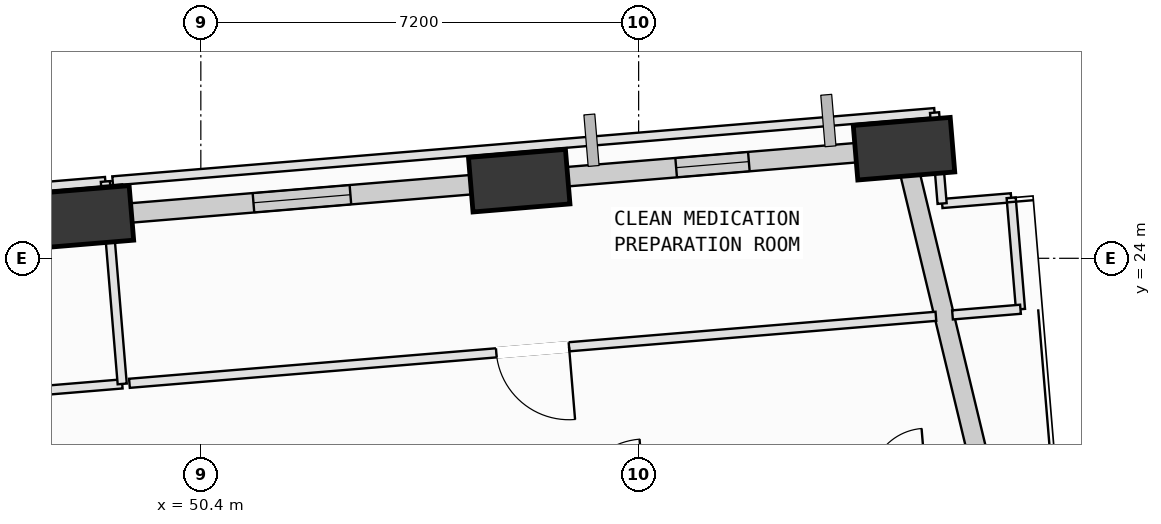
"""IFC4 building model, lengths in metres.
Left out: names, types, materials, properties, quantities, classifications, styles, units other than length and angle.
Written with IfcOpenShell. Run it as: python <this file> out.ifc"""

import sys

from ifc_helpers import new_model, si_unit, direction, frame, frame_2d, origin, origin_2d, place, context, subcontext, project, spatial, rectangle, extrude, element, fill, save


model = new_model("IFC4")
c1 = context("Model", 3, precision=1e-05, world=origin(), true_north=direction((0.0, 1.0)))
c2 = subcontext(c1, "Body", "Model", "MODEL_VIEW")
j1 = project(units=[si_unit("LENGTHUNIT", "METRE"), si_unit("PLANEANGLEUNIT", "RADIAN")], contexts=[c1])
p1 = place(None, origin())
s1 = spatial("IfcSite", under=j1, at=p1, CompositionType="ELEMENT")
p2 = place(p1, origin())
s2 = spatial("IfcBuilding", under=s1, at=p2, CompositionType="ELEMENT")
p3 = place(p2, frame((0.0, 0.0, 43.0)))
s3 = spatial("IfcBuildingStorey", under=s2, at=p3, CompositionType="ELEMENT", Elevation=43.0)
p4 = place(p3, frame((61.964, 25.802, 0.002), z_axis=(-0.00509619304, 0.116727088199, 0.993150953127), x_axis=(-0.992029926885, -0.125630471122, 0.009675168759)))
e1 = element("IfcColumn", 1, at=p4, inside=s3, PredefinedType="COLUMN", context=c2, shape_type="SweptSolid", body=[
    extrude(rectangle(XDim=1.6, YDim=0.9, at=origin_2d()), origin(), (0.0, 0.0, 1.0), 4.024),
])
p5 = place(p3, frame((55.636, 25.277, 0.002), z_axis=(-0.002737528383, 0.090946776294, 0.995851991925), x_axis=(-0.993633257969, -0.112410761084, 0.007534550471)))
e2 = element("IfcColumn", 2, at=p5, inside=s3, PredefinedType="COLUMN", context=c2, shape_type="SweptSolid", body=[
    extrude(rectangle(XDim=1.6, YDim=0.9, at=origin_2d()), origin(), (0.0, 0.0, 1.0), 4.013),
])
p6 = place(p3, frame((48.461, 24.68, 0.002), z_axis=(0.0, 0.061459648472, 0.99810956894), x_axis=(-0.996565502498, -0.082651664305, 0.005089363324)))
e3 = element("IfcColumn", 3, at=p6, inside=s3, PredefinedType="COLUMN", context=c2, shape_type="SweptSolid", body=[
    extrude(rectangle(XDim=1.6, YDim=0.9, at=origin_2d()), origin(), (0.0, 0.0, 1.0), 4.004),
])
p7 = place(p3, frame((62.052, 25.438, 0.0), z_axis=(0.0, 0.0, 1.0), x_axis=(0.234137183884, -0.972203568767, 0.0)))
e4 = element("IfcWall", 4, at=p7, inside=s3, PredefinedType="SOLIDWALL", context=c2, shape_type="SweptSolid", body=[
    extrude(rectangle(XDim=8.614, YDim=0.32, at=frame_2d((4.307, 0.0))), origin(), (0.0, 0.0, 1.0), 3.165),
])
p8 = place(p3, frame((56.224, 25.325, 0.0), z_axis=(0.0, 0.0, 1.0), x_axis=(0.996565124027, 0.08281276214, 0.0)))
e5 = element("IfcWall", 5, at=p8, inside=s3, PredefinedType="SOLIDWALL", context=c2, shape_type="SweptSolid", body=[
    extrude(rectangle(XDim=5.209, YDim=0.32, at=frame_2d((2.604, 0.0))), origin(), (0.0, 0.0, 1.0), 3.165),
])
p9 = place(p8, frame((2.0, 0.0, 0.75)))
e6 = element("IfcOpeningElement", 6, at=p9, cuts=e5, PredefinedType="OPENING", context=c2, shape_type="SweptSolid", body=[
    extrude(rectangle(XDim=1.2, YDim=1.75, at=frame_2d((0.6, 0.875))), frame((0.0, 0.17, 0.0), z_axis=(0.0, -1.0, 0.0), x_axis=(1.0, 0.0, 0.0)), (0.0, 0.0, 1.0), 0.34),
])
p10 = place(p3, frame((49.064, 24.73, 0.0), z_axis=(0.0, 0.0, 1.0), x_axis=(0.99656334349, 0.082834186251, 0.0)))
e7 = element("IfcWall", 7, at=p10, inside=s3, PredefinedType="SOLIDWALL", context=c2, shape_type="SweptSolid", body=[
    extrude(rectangle(XDim=6.024, YDim=0.32, at=frame_2d((3.012, 0.0))), origin(), (0.0, 0.0, 1.0), 3.165),
])
p11 = place(p10, frame((2.209, 0.0, 0.75)))
e8 = element("IfcOpeningElement", 8, at=p11, cuts=e7, PredefinedType="OPENING", context=c2, shape_type="SweptSolid", body=[
    extrude(rectangle(XDim=1.6, YDim=1.95, at=frame_2d((0.8, 0.975))), frame((0.0, 0.17, 0.0), z_axis=(0.0, -1.0, 0.0), x_axis=(1.0, 0.0, 0.0)), (0.0, 0.0, 1.0), 0.34),
])
p12 = place(p3, frame((49.107, 21.934, 0.0), z_axis=(0.0, 0.0, 1.0), x_axis=(-0.996568963574, -0.082766544215, 0.0)))
e9 = element("IfcWall", 9, at=p12, inside=s3, PredefinedType="PARTITIONING", context=c2, shape_type="SweptSolid", body=[
    extrude(rectangle(XDim=14.705, YDim=0.15, at=frame_2d((7.352, 0.0))), origin(), (0.0, 0.0, 1.0), 3.78),
])
p13 = place(p12, frame((6.752, 0.0, 0.0)))
e10 = element("IfcOpeningElement", 10, at=p13, cuts=e9, PredefinedType="OPENING", context=c2, shape_type="SweptSolid", body=[
    extrude(rectangle(XDim=1.2, YDim=2.15, at=frame_2d((0.6, 1.075))), frame((0.0, 0.085, 0.0), z_axis=(0.0, -1.0, 0.0), x_axis=(1.0, 0.0, 0.0)), (0.0, 0.0, 1.0), 0.17),
])
p14 = place(p3, frame((34.176, 24.045, 0.0), z_axis=(0.0, 0.0, 1.0), x_axis=(0.99656348355, 0.082832501198, 0.0)))
e11 = element("IfcWall", 11, at=p14, inside=s3, PredefinedType="PARTITIONING", context=c2, shape_type="SweptSolid", body=[
    extrude(rectangle(XDim=14.705, YDim=0.15, at=frame_2d((7.352, 0.0))), origin(), (0.0, 0.0, 1.0), 3.165),
])
p15 = place(p3, frame((48.83, 25.263, 0.0), z_axis=(0.0, 0.0, 1.0), x_axis=(0.082882164129, -0.996559354414, 0.0)))
e12 = element("IfcWall", 12, at=p15, inside=s3, PredefinedType="PARTITIONING", context=c2, shape_type="SweptSolid", body=[
    extrude(rectangle(XDim=3.34, YDim=0.15, at=frame_2d((1.67, 0.0))), origin(), (0.0, 0.0, 1.0), 3.78),
])
p16 = place(p3, frame((62.591, 24.901, 0.0), z_axis=(0.0, 0.0, 1.0), x_axis=(0.996576707812, 0.08267324505, 0.0)))
e13 = element("IfcWall", 13, at=p16, inside=s3, PredefinedType="PARTITIONING", context=c2, shape_type="SweptSolid", body=[
    extrude(rectangle(XDim=1.14, YDim=0.15, at=frame_2d((0.57, 0.0))), origin(), (0.0, 0.0, 1.0), 3.78),
])
p17 = place(p3, frame((63.727, 24.995, 0.0), z_axis=(0.0, 0.0, 1.0), x_axis=(0.083089418212, -0.99654209574, 0.0)))
e14 = element("IfcWall", 14, at=p17, inside=s3, PredefinedType="PARTITIONING", context=c2, shape_type="SweptSolid", body=[
    extrude(rectangle(XDim=1.839, YDim=0.15, at=frame_2d((0.92, 0.0))), origin(), (0.0, 0.0, 1.0), 3.78),
])
p18 = place(p3, frame((63.88, 23.162, 0.0), z_axis=(0.0, 0.0, 1.0), x_axis=(-0.996556256846, -0.082919400275, 0.0)))
e15 = element("IfcWall", 15, at=p18, inside=s3, PredefinedType="PARTITIONING", context=c2, shape_type="SweptSolid", body=[
    extrude(rectangle(XDim=1.122, YDim=0.15, at=frame_2d((0.561, 0.0))), origin(), (0.0, 0.0, 1.0), 3.78),
])
p19 = place(p3, frame((62.489, 23.046, 0.0), z_axis=(0.0, 0.0, 1.0), x_axis=(-0.996567106094, -0.082788906577, 0.0)))
e16 = element("IfcWall", 16, at=p19, inside=s3, PredefinedType="PARTITIONING", context=c2, shape_type="SweptSolid", body=[
    extrude(rectangle(XDim=13.309, YDim=0.15, at=frame_2d((6.654, 0.0))), origin(), (0.0, 0.0, 1.0), 3.78),
])
p20 = place(p19, frame((6.054, 0.0, 0.0)))
e17 = element("IfcOpeningElement", 17, at=p20, cuts=e16, PredefinedType="OPENING", context=c2, shape_type="SweptSolid", body=[
    extrude(rectangle(XDim=1.2, YDim=2.15, at=frame_2d((0.6, 1.075))), frame((0.0, 0.085, 0.0), z_axis=(0.0, -1.0, 0.0), x_axis=(1.0, 0.0, 0.0)), (0.0, 0.0, 1.0), 0.17),
])
p21 = place(p3, frame((48.95, 25.273, 0.0), z_axis=(0.0, 0.0, 1.0), x_axis=(0.996566334014, 0.082798199915, 0.0)))
e18 = element("IfcWall", 18, at=p21, inside=s3, PredefinedType="PARTITIONING", context=c2, shape_type="SweptSolid", body=[
    extrude(rectangle(XDim=13.564, YDim=0.15, at=frame_2d((6.782, 0.0))), origin(), (0.0, 0.0, 1.0), 3.165),
])
p22 = place(p3, frame((62.467, 26.396, 0.0), z_axis=(0.0, 0.0, 1.0), x_axis=(0.082668382184, -0.99657711121, 0.0)))
e19 = element("IfcWall", 19, at=p22, inside=s3, PredefinedType="PARTITIONING", context=c2, shape_type="SweptSolid", body=[
    extrude(rectangle(XDim=1.5, YDim=0.15, at=frame_2d((0.75, 0.0))), origin(), (0.0, 0.0, 1.0), 3.165),
])
p23 = place(p9, origin())
e20 = element("IfcWindow", 20, at=p23, inside=s3, PartitioningType="SINGLE_PANEL", PredefinedType="WINDOW", context=c2, shape_type="SweptSolid", body=[
    extrude(rectangle(XDim=1.2, YDim=1.75, at=frame_2d((0.6, 0.875))), frame((0.0, 0.03, 0.0), z_axis=(0.0, -1.0, 0.0), x_axis=(1.0, 0.0, 0.0)), (0.0, 0.0, 1.0), 0.06),
])
fill(e6, e20)
p24 = place(p11, origin())
e21 = element("IfcWindow", 21, at=p24, inside=s3, PartitioningType="SINGLE_PANEL", PredefinedType="WINDOW", context=c2, shape_type="SweptSolid", body=[
    extrude(rectangle(XDim=1.6, YDim=1.95, at=frame_2d((0.8, 0.975))), frame((0.0, 0.03, 0.0), z_axis=(0.0, -1.0, 0.0), x_axis=(1.0, 0.0, 0.0)), (0.0, 0.0, 1.0), 0.06),
])
fill(e8, e21)
p25 = place(p20, origin())
e22 = element("IfcDoor", 22, at=p25, inside=s3, OperationType="SINGLE_SWING_LEFT", PredefinedType="DOOR", context=c2, shape_type="SweptSolid", body=[
    extrude(rectangle(XDim=1.2, YDim=2.15, at=frame_2d((0.6, 1.075))), frame((0.0, 0.025, 0.0), z_axis=(0.0, -1.0, 0.0), x_axis=(1.0, 0.0, 0.0)), (0.0, 0.0, 1.0), 0.05),
])
fill(e17, e22)
save(model, sys.argv[1])
